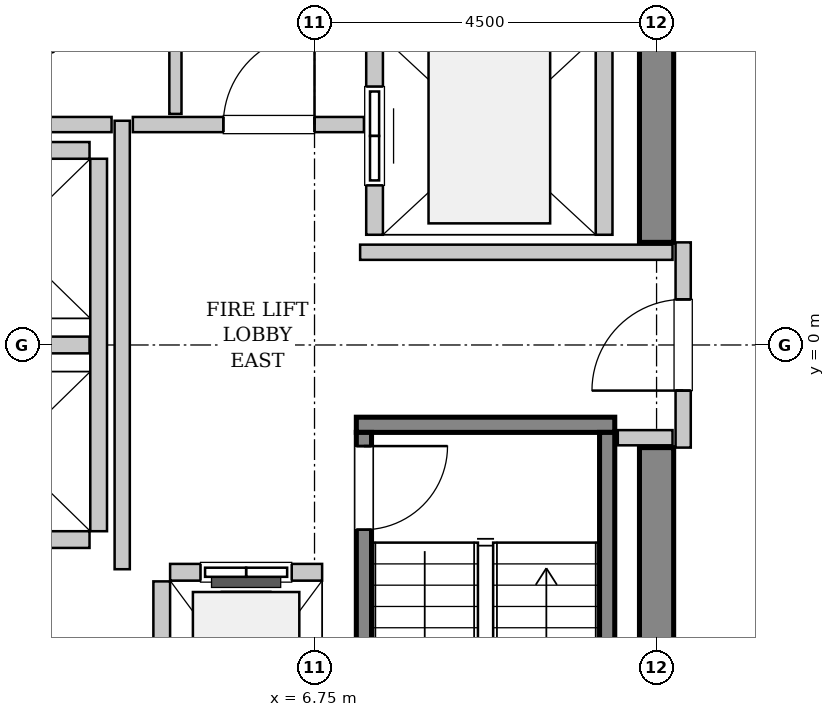
"""IFC4 building model, lengths in metres.
Left out: names, types, materials, properties, quantities, classifications, styles, units other than length and angle.
Written with IfcOpenShell. Run it as: python <this file> out.ifc"""

import sys

from ifc_helpers import new_model, si_unit, direction, frame, frame_2d, origin, place, context, subcontext, project, spatial, rectangle, extrude, source, transform, mapped, element, fill, save


model = new_model("IFC4")
c1 = context("Model", 3, precision=1e-05, world=origin(), true_north=direction((0.0, 1.0)))
c2 = subcontext(c1, "Body", "Model", "MODEL_VIEW")
j1 = project(units=[si_unit("LENGTHUNIT", "METRE"), si_unit("PLANEANGLEUNIT", "RADIAN")], contexts=[c1])
p1 = place(None, origin())
s1 = spatial("IfcSite", under=j1, at=p1, CompositionType="ELEMENT")
p2 = place(p1, origin())
s2 = spatial("IfcBuilding", under=s1, at=p2, CompositionType="ELEMENT")
p3 = place(p2, frame((0.0, 0.0, 264.6)))
s3 = spatial("IfcBuildingStorey", under=s2, at=p3, CompositionType="ELEMENT", Elevation=264.6)
m1 = source(origin(), c2, "Body", "SweptSolid", [
    extrude(rectangle(XDim=7.425, YDim=0.45, at=frame_2d((3.712, 0.0))), origin(), (0.0, 0.0, 1.0), 3.8),
])
for number, where, z_axis, x_axis in (
    (1, (11.25, -8.775, 0.0), (0.0, 0.0, 1.0), (0.0, 1.0, 0.0)),
    (2, (11.25, 1.35, 0.0), (0.0, 0.0, 1.0), (0.0, 1.0, 0.0)),
):
    element("IfcWall", number, at=place(p3, frame(where, z_axis=z_axis, x_axis=x_axis)), inside=s3, PredefinedType="SHEAR", context=c2, shape_type="MappedRepresentation", body=[
        mapped(m1, transform((0.0, 0.0, 0.0), x_axis=(1.0, 0.0, 0.0), y_axis=(0.0, 1.0, 0.0), z_axis=(0.0, 0.0, 1.0), scale=1.0)),
    ])
m2 = source(origin(), c2, "Body", "SweptSolid", [
    extrude(rectangle(XDim=3.4, YDim=0.2, at=frame_2d((1.7, 0.0))), origin(), (0.0, 0.0, 1.0), 3.8),
])
p4 = place(p3, frame((7.3, -1.05, 0.0), z_axis=(0.0, 0.0, 1.0), x_axis=(1.0, 0.0, 0.0)))
e3 = element("IfcWall", 3, at=p4, inside=s3, PredefinedType="SOLIDWALL", context=c2, shape_type="MappedRepresentation", body=[
    mapped(m2, transform((0.0, 0.0, 0.0), x_axis=(1.0, 0.0, 0.0), y_axis=(0.0, 1.0, 0.0), z_axis=(0.0, 0.0, 1.0), scale=1.0)),
])
m3 = source(origin(), c2, "Body", "SweptSolid", [
    extrude(rectangle(XDim=7.1, YDim=0.2, at=frame_2d((3.55, 0.0))), origin(), (0.0, 0.0, 1.0), 3.8),
])
p5 = place(p3, frame((7.4, -1.15, 0.0), z_axis=(0.0, 0.0, 1.0), x_axis=(0.0, -1.0, 0.0)))
e4 = element("IfcWall", 4, at=p5, inside=s3, PredefinedType="SOLIDWALL", context=c2, shape_type="MappedRepresentation", body=[
    mapped(m3, transform((0.0, 0.0, 0.0), x_axis=(1.0, 0.0, 0.0), y_axis=(0.0, 1.0, 0.0), z_axis=(0.0, 0.0, 1.0), scale=1.0)),
])
p6 = place(p5, frame((0.18, 0.0, 0.0)))
e5 = element("IfcOpeningElement", 5, at=p6, cuts=e4, PredefinedType="OPENING", context=c2, shape_type="SweptSolid", body=[
    extrude(rectangle(XDim=1.1, YDim=2.15, at=frame_2d((0.55, 1.075))), frame((0.0, 0.11, 0.0), z_axis=(0.0, -1.0, 0.0), x_axis=(1.0, 0.0, 0.0)), (0.0, 0.0, 1.0), 0.22),
])
p7 = place(p3, frame((10.6, -1.15, 0.0), z_axis=(0.0, 0.0, 1.0), x_axis=(0.0, -1.0, 0.0)))
e6 = element("IfcWall", 6, at=p7, inside=s3, PredefinedType="SOLIDWALL", context=c2, shape_type="MappedRepresentation", body=[
    mapped(m3, transform((0.0, 0.0, 0.0), x_axis=(1.0, 0.0, 0.0), y_axis=(0.0, 1.0, 0.0), z_axis=(0.0, 0.0, 1.0), scale=1.0)),
])
m4 = source(origin(), c2, "Body", "SweptSolid", [
    extrude(rectangle(XDim=2.0, YDim=0.22, at=frame_2d((1.0, 0.0))), origin(), (0.0, 0.0, 1.0), 3.535),
])
p8 = place(p3, frame((6.85, -2.99, 0.0), z_axis=(0.0, 0.0, 1.0), x_axis=(-1.0, 0.0, 0.0)))
e7 = element("IfcWall", 7, at=p8, inside=s3, PredefinedType="SOLIDWALL", context=c2, shape_type="MappedRepresentation", body=[
    mapped(m4, transform((0.0, 0.0, 0.0), x_axis=(1.0, 0.0, 0.0), y_axis=(0.0, 1.0, 0.0), z_axis=(0.0, 0.0, 1.0), scale=1.0)),
])
p9 = place(p8, frame((0.4, 0.0, 0.0)))
e8 = element("IfcOpeningElement", 8, at=p9, cuts=e7, PredefinedType="OPENING", context=c2, shape_type="SweptSolid", body=[
    extrude(rectangle(XDim=1.2, YDim=2.2, at=frame_2d((0.6, 1.1))), frame((0.0, 0.12, 0.0), z_axis=(0.0, -1.0, 0.0), x_axis=(1.0, 0.0, 0.0)), (0.0, 0.0, 1.0), 0.24),
])
m5 = source(origin(), c2, "Body", "SweptSolid", [
    extrude(rectangle(XDim=2.68, YDim=0.22, at=frame_2d((1.34, 0.0))), origin(), (0.0, 0.0, 1.0), 3.535),
])
p10 = place(p3, frame((4.74, -3.11, 0.0), z_axis=(0.0, 0.0, 1.0), x_axis=(0.0, -1.0, 0.0)))
e9 = element("IfcWall", 9, at=p10, inside=s3, PredefinedType="SOLIDWALL", context=c2, shape_type="MappedRepresentation", body=[
    mapped(m5, transform((0.0, 0.0, 0.0), x_axis=(1.0, 0.0, 0.0), y_axis=(0.0, 1.0, 0.0), z_axis=(0.0, 0.0, 1.0), scale=1.0)),
])
m6 = source(origin(), c2, "Body", "SweptSolid", [
    extrude(rectangle(XDim=5.45, YDim=0.22, at=frame_2d((2.725, 0.0))), origin(), (0.0, 0.0, 1.0), 3.535),
])
p11 = place(p3, frame((7.54, 6.9, 0.0), z_axis=(0.0, 0.0, 1.0), x_axis=(0.0, -1.0, 0.0)))
e10 = element("IfcWall", 10, at=p11, inside=s3, PredefinedType="SOLIDWALL", context=c2, shape_type="MappedRepresentation", body=[
    mapped(m6, transform((0.0, 0.0, 0.0), x_axis=(1.0, 0.0, 0.0), y_axis=(0.0, 1.0, 0.0), z_axis=(0.0, 0.0, 1.0), scale=1.0)),
])
p12 = place(p11, frame((3.5, 0.0, 0.0)))
e11 = element("IfcOpeningElement", 11, at=p12, cuts=e10, PredefinedType="OPENING", context=c2, shape_type="SweptSolid", body=[
    extrude(rectangle(XDim=1.3, YDim=2.3, at=frame_2d((0.65, 1.15))), frame((0.0, 0.12, 0.0), z_axis=(0.0, -1.0, 0.0), x_axis=(1.0, 0.0, 0.0)), (0.0, 0.0, 1.0), 0.24),
])
p13 = place(p11, frame((0.65, 0.0, 0.0)))
e12 = element("IfcOpeningElement", 12, at=p13, cuts=e10, PredefinedType="OPENING", context=c2, shape_type="SweptSolid", body=[
    extrude(rectangle(XDim=1.3, YDim=2.3, at=frame_2d((0.65, 1.15))), frame((0.0, 0.12, 0.0), z_axis=(0.0, -1.0, 0.0), x_axis=(1.0, 0.0, 0.0)), (0.0, 0.0, 1.0), 0.24),
])
p14 = place(p3, frame((10.56, 1.45, 0.0), z_axis=(0.0, 0.0, 1.0), x_axis=(0.0, 1.0, 0.0)))
e13 = element("IfcWall", 13, at=p14, inside=s3, PredefinedType="SOLIDWALL", context=c2, shape_type="MappedRepresentation", body=[
    mapped(m6, transform((0.0, 0.0, 0.0), x_axis=(1.0, 0.0, 0.0), y_axis=(0.0, 1.0, 0.0), z_axis=(0.0, 0.0, 1.0), scale=1.0)),
])
m7 = source(origin(), c2, "Body", "SweptSolid", [
    extrude(rectangle(XDim=4.9, YDim=0.22, at=frame_2d((2.45, 0.0))), origin(), (0.0, 0.0, 1.0), 3.535),
])
p15 = place(p3, frame((3.91, -2.45, 0.0), z_axis=(0.0, 0.0, 1.0), x_axis=(0.0, 1.0, 0.0)))
e14 = element("IfcWall", 14, at=p15, inside=s3, PredefinedType="SOLIDWALL", context=c2, shape_type="MappedRepresentation", body=[
    mapped(m7, transform((0.0, 0.0, 0.0), x_axis=(1.0, 0.0, 0.0), y_axis=(0.0, 1.0, 0.0), z_axis=(0.0, 0.0, 1.0), scale=1.0)),
])
m8 = source(origin(), c2, "Body", "SweptSolid", [
    extrude(rectangle(XDim=2.13, YDim=0.22, at=frame_2d((1.065, 0.0))), origin(), (0.0, 0.0, 1.0), 3.535),
])
for number, where, z_axis, x_axis in (
    (15, (1.66, -2.56, 0.0), (0.0, 0.0, 1.0), (1.0, 0.0, 0.0)),
    (16, (1.66, 0.0, 0.0), (0.0, 0.0, 1.0), (1.0, 0.0, 0.0)),
    (17, (3.79, 2.56, 0.0), (0.0, 0.0, 1.0), (-1.0, 0.0, 0.0)),
):
    element("IfcWall", number, at=place(p3, frame(where, z_axis=z_axis, x_axis=x_axis)), inside=s3, PredefinedType="SOLIDWALL", context=c2, shape_type="MappedRepresentation", body=[
        mapped(m8, transform((0.0, 0.0, 0.0), x_axis=(1.0, 0.0, 0.0), y_axis=(0.0, 1.0, 0.0), z_axis=(0.0, 0.0, 1.0), scale=1.0)),
    ])
m9 = source(origin(), c2, "Body", "SweptSolid", [
    extrude(rectangle(XDim=2.7, YDim=0.2, at=frame_2d((1.35, 0.0))), origin(), (0.0, 0.0, 1.0), 2.625),
])
p16 = place(p3, frame((11.6, -1.35, 0.0), z_axis=(0.0, 0.0, 1.0), x_axis=(0.0, 1.0, 0.0)))
e18 = element("IfcWall", 18, at=p16, inside=s3, PredefinedType="PARTITIONING", context=c2, shape_type="MappedRepresentation", body=[
    mapped(m9, transform((0.0, 0.0, 0.0), x_axis=(1.0, 0.0, 0.0), y_axis=(0.0, 1.0, 0.0), z_axis=(0.0, 0.0, 1.0), scale=1.0)),
])
p17 = place(p16, frame((0.75, 0.0, 0.0)))
e19 = element("IfcOpeningElement", 19, at=p17, cuts=e18, PredefinedType="OPENING", context=c2, shape_type="SweptSolid", body=[
    extrude(rectangle(XDim=1.2, YDim=2.15, at=frame_2d((0.6, 1.075))), frame((0.0, 0.11, 0.0), z_axis=(0.0, -1.0, 0.0), x_axis=(1.0, 0.0, 0.0)), (0.0, 0.0, 1.0), 0.22),
])
m10 = source(origin(), c2, "Body", "SweptSolid", [
    extrude(rectangle(XDim=5.9, YDim=0.2, at=frame_2d((2.95, 0.0))), origin(), (0.0, 0.0, 1.0), 3.535),
])
p18 = place(p3, frame((4.22, -2.95, 0.0), z_axis=(0.0, 0.0, 1.0), x_axis=(0.0, 1.0, 0.0)))
e20 = element("IfcWall", 20, at=p18, inside=s3, PredefinedType="PARTITIONING", context=c2, shape_type="MappedRepresentation", body=[
    mapped(m10, transform((0.0, 0.0, 0.0), x_axis=(1.0, 0.0, 0.0), y_axis=(0.0, 1.0, 0.0), z_axis=(0.0, 0.0, 1.0), scale=1.0)),
])
m11 = source(origin(), c2, "Body", "SweptSolid", [
    extrude(rectangle(XDim=2.52, YDim=0.2, at=frame_2d((1.26, 0.0))), origin(), (0.0, 0.0, 1.0), 3.535),
])
p19 = place(p3, frame((1.56, 2.9, 0.0), z_axis=(0.0, 0.0, 1.0), x_axis=(1.0, 0.0, 0.0)))
e21 = element("IfcWall", 21, at=p19, inside=s3, PredefinedType="PARTITIONING", context=c2, shape_type="MappedRepresentation", body=[
    mapped(m11, transform((0.0, 0.0, 0.0), x_axis=(1.0, 0.0, 0.0), y_axis=(0.0, 1.0, 0.0), z_axis=(0.0, 0.0, 1.0), scale=1.0)),
])
m12 = source(origin(), c2, "Body", "SweptSolid", [
    extrude(rectangle(XDim=3.04, YDim=0.2, at=frame_2d((1.52, 0.0))), origin(), (0.0, 0.0, 1.0), 3.535),
])
p20 = place(p3, frame((4.36, 2.9, 0.0), z_axis=(0.0, 0.0, 1.0), x_axis=(1.0, 0.0, 0.0)))
e22 = element("IfcWall", 22, at=p20, inside=s3, PredefinedType="PARTITIONING", context=c2, shape_type="MappedRepresentation", body=[
    mapped(m12, transform((0.0, 0.0, 0.0), x_axis=(1.0, 0.0, 0.0), y_axis=(0.0, 1.0, 0.0), z_axis=(0.0, 0.0, 1.0), scale=1.0)),
])
p21 = place(p20, frame((1.19, 0.0, 0.0)))
e23 = element("IfcOpeningElement", 23, at=p21, cuts=e22, PredefinedType="OPENING", context=c2, shape_type="SweptSolid", body=[
    extrude(rectangle(XDim=1.2, YDim=2.15, at=frame_2d((0.6, 1.075))), frame((0.0, 0.11, 0.0), z_axis=(0.0, -1.0, 0.0), x_axis=(1.0, 0.0, 0.0)), (0.0, 0.0, 1.0), 0.22),
])
m13 = source(origin(), c2, "Body", "SweptSolid", [
    extrude(rectangle(XDim=4.11, YDim=0.2, at=frame_2d((2.055, 0.0))), origin(), (0.0, 0.0, 1.0), 3.535),
])
p22 = place(p3, frame((7.35, 1.22, 0.0), z_axis=(0.0, 0.0, 1.0), x_axis=(1.0, 0.0, 0.0)))
e24 = element("IfcWall", 24, at=p22, inside=s3, PredefinedType="PARTITIONING", context=c2, shape_type="MappedRepresentation", body=[
    mapped(m13, transform((0.0, 0.0, 0.0), x_axis=(1.0, 0.0, 0.0), y_axis=(0.0, 1.0, 0.0), z_axis=(0.0, 0.0, 1.0), scale=1.0)),
])
m14 = source(origin(), c2, "Body", "SweptSolid", [
    extrude(rectangle(XDim=0.72, YDim=0.2, at=frame_2d((0.36, 0.0))), origin(), (0.0, 0.0, 1.0), 3.535),
])
p23 = place(p3, frame((10.74, -1.22, 0.0), z_axis=(0.0, 0.0, 1.0), x_axis=(1.0, 0.0, 0.0)))
e25 = element("IfcWall", 25, at=p23, inside=s3, PredefinedType="PARTITIONING", context=c2, shape_type="MappedRepresentation", body=[
    mapped(m14, transform((0.0, 0.0, 0.0), x_axis=(1.0, 0.0, 0.0), y_axis=(0.0, 1.0, 0.0), z_axis=(0.0, 0.0, 1.0), scale=1.0)),
])
m15 = source(origin(), c2, "Body", "SweptSolid", [
    extrude(rectangle(XDim=5.45, YDim=0.16, at=frame_2d((2.725, 0.0))), origin(), (0.0, 0.0, 1.0), 3.535),
])
p24 = place(p3, frame((4.92, 3.04, 0.0), z_axis=(0.0, 0.0, 1.0), x_axis=(0.0, 1.0, 0.0)))
e26 = element("IfcWall", 26, at=p24, inside=s3, PredefinedType="PARTITIONING", context=c2, shape_type="MappedRepresentation", body=[
    mapped(m15, transform((0.0, 0.0, 0.0), x_axis=(1.0, 0.0, 0.0), y_axis=(0.0, 1.0, 0.0), z_axis=(0.0, 0.0, 1.0), scale=1.0)),
])
m16 = source(origin(), c2, "Body", "SweptSolid", [
    extrude(rectangle(XDim=1.1, YDim=2.15, at=frame_2d((0.55, 1.075))), frame((0.0, 0.025, 0.0), z_axis=(0.0, -1.0, 0.0), x_axis=(1.0, 0.0, 0.0)), (0.0, 0.0, 1.0), 0.05),
])
p25 = place(p6, origin())
e27 = element("IfcDoor", 27, at=p25, inside=s3, OperationType="SINGLE_SWING_LEFT", PredefinedType="DOOR", context=c2, shape_type="MappedRepresentation", body=[
    mapped(m16, transform((0.0, 0.0, 0.0), x_axis=(1.0, 0.0, 0.0), y_axis=(0.0, 1.0, 0.0), z_axis=(0.0, 0.0, 1.0), scale=1.0)),
])
fill(e5, e27)
m17 = source(origin(), c2, "Body", "SweptSolid", [
    extrude(rectangle(XDim=1.2, YDim=2.2, at=frame_2d((0.6, 1.1))), frame((0.0, 0.025, 0.0), z_axis=(0.0, -1.0, 0.0), x_axis=(1.0, 0.0, 0.0)), (0.0, 0.0, 1.0), 0.05),
])
p26 = place(p9, origin())
e28 = element("IfcDoor", 28, at=p26, inside=s3, OperationType="SLIDING_TO_LEFT", PredefinedType="DOOR", context=c2, shape_type="MappedRepresentation", body=[
    mapped(m17, transform((0.0, 0.0, 0.0), x_axis=(1.0, 0.0, 0.0), y_axis=(0.0, 1.0, 0.0), z_axis=(0.0, 0.0, 1.0), scale=1.0)),
])
fill(e8, e28)
m18 = source(origin(), c2, "Body", "SweptSolid", [
    extrude(rectangle(XDim=1.3, YDim=2.3, at=frame_2d((0.65, 1.15))), frame((0.0, 0.025, 0.0), z_axis=(0.0, -1.0, 0.0), x_axis=(1.0, 0.0, 0.0)), (0.0, 0.0, 1.0), 0.05),
])
p27 = place(p12, origin())
e29 = element("IfcDoor", 29, at=p27, inside=s3, OperationType="SLIDING_TO_RIGHT", PredefinedType="DOOR", context=c2, shape_type="MappedRepresentation", body=[
    mapped(m18, transform((0.0, 0.0, 0.0), x_axis=(1.0, 0.0, 0.0), y_axis=(0.0, 1.0, 0.0), z_axis=(0.0, 0.0, 1.0), scale=1.0)),
])
fill(e11, e29)
m19 = source(origin(), c2, "Body", "SweptSolid", [
    extrude(rectangle(XDim=1.2, YDim=2.15, at=frame_2d((0.6, 1.075))), frame((0.0, 0.025, 0.0), z_axis=(0.0, -1.0, 0.0), x_axis=(1.0, 0.0, 0.0)), (0.0, 0.0, 1.0), 0.05),
])
p28 = place(p17, origin())
e30 = element("IfcDoor", 30, at=p28, inside=s3, OperationType="SINGLE_SWING_LEFT", PredefinedType="DOOR", context=c2, shape_type="MappedRepresentation", body=[
    mapped(m19, transform((0.0, 0.0, 0.0), x_axis=(1.0, 0.0, 0.0), y_axis=(0.0, 1.0, 0.0), z_axis=(0.0, 0.0, 1.0), scale=1.0)),
])
fill(e19, e30)
p29 = place(p21, origin())
e31 = element("IfcDoor", 31, at=p29, inside=s3, OperationType="SINGLE_SWING_RIGHT", PredefinedType="DOOR", context=c2, shape_type="MappedRepresentation", body=[
    mapped(m19, transform((0.0, 0.0, 0.0), x_axis=(1.0, 0.0, 0.0), y_axis=(0.0, 1.0, 0.0), z_axis=(0.0, 0.0, 1.0), scale=1.0)),
])
fill(e23, e31)
save(model, sys.argv[1])
